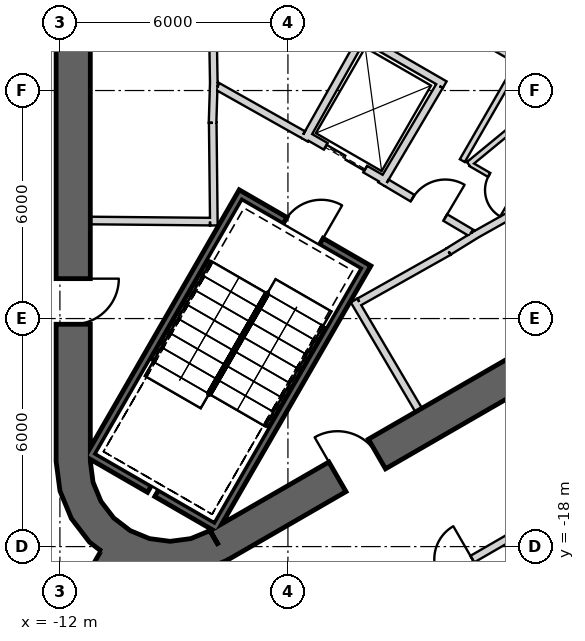
"""IFC4 building model, lengths in metres.
Left out: names, types, materials, properties, quantities, classifications, styles, units other than length and angle.
Written with IfcOpenShell. Run it as: python <this file> out.ifc"""

import sys

from ifc_helpers import new_model, si_unit, direction, frame, frame_2d, origin, place, context, subcontext, project, spatial, polyline, rectangle, outline, extrude, element, fill, save


model = new_model("IFC4")
c1 = context("Model", 3, precision=1e-05, world=origin(), true_north=direction((0.0, 1.0)))
c2 = subcontext(c1, "Body", "Model", "MODEL_VIEW")
j1 = project(units=[si_unit("LENGTHUNIT", "METRE"), si_unit("PLANEANGLEUNIT", "RADIAN")], contexts=[c1])
p1 = place(None, origin())
s1 = spatial("IfcSite", under=j1, at=p1, CompositionType="ELEMENT")
p2 = place(p1, origin())
s2 = spatial("IfcBuilding", under=s1, at=p2, CompositionType="ELEMENT")
p3 = place(p2, frame((0.0, 0.0, 163.2)))
s3 = spatial("IfcBuildingStorey", under=s2, at=p3, CompositionType="ELEMENT", Elevation=163.2)
p4 = place(p3, frame((-11.65, 15.762, 0.0), z_axis=(0.0, 0.0, 1.0), x_axis=(0.0, -1.0, 0.0)))
e1 = element("IfcWall", 1, at=p4, inside=s3, PredefinedType="SHEAR", context=c2, shape_type="SweptSolid", body=[
    extrude(rectangle(XDim=31.523, YDim=0.9, at=frame_2d((15.762, 0.0))), origin(), (0.0, 0.0, 1.0), 6.0),
])
p5 = place(p4, frame((3.612, 0.0, 0.0)))
e2 = element("IfcOpeningElement", 2, at=p5, cuts=e1, PredefinedType="OPENING", context=c2, shape_type="SweptSolid", body=[
    extrude(rectangle(XDim=1.2, YDim=2.4, at=frame_2d((0.6, 1.2))), frame((0.0, 0.46, 0.0), z_axis=(0.0, -1.0, 0.0), x_axis=(1.0, 0.0, 0.0)), (0.0, 0.0, 1.0), 0.92),
])
p6 = place(p4, frame((26.712, 0.0, 0.0)))
e3 = element("IfcOpeningElement", 3, at=p6, cuts=e1, PredefinedType="OPENING", context=c2, shape_type="SweptSolid", body=[
    extrude(rectangle(XDim=1.2, YDim=2.4, at=frame_2d((0.6, 1.2))), frame((0.0, 0.46, 0.0), z_axis=(0.0, -1.0, 0.0), x_axis=(1.0, 0.0, 0.0)), (0.0, 0.0, 1.0), 0.92),
])
p7 = place(p3, frame((-7.825, -17.97, 0.0), z_axis=(0.0, 0.0, 1.0), x_axis=(0.866028369851, 0.499994862586, 0.0)))
e4 = element("IfcWall", 4, at=p7, inside=s3, PredefinedType="SHEAR", context=c2, shape_type="SweptSolid", body=[
    extrude(rectangle(XDim=31.523, YDim=0.9, at=frame_2d((15.762, 0.0))), origin(), (0.0, 0.0, 1.0), 6.0),
])
p8 = place(p7, frame((26.712, 0.0, 0.0)))
e5 = element("IfcOpeningElement", 5, at=p8, cuts=e4, PredefinedType="OPENING", context=c2, shape_type="SweptSolid", body=[
    extrude(rectangle(XDim=1.2, YDim=2.4, at=frame_2d((0.6, 1.2))), frame((0.0, 0.46, 0.0), z_axis=(0.0, -1.0, 0.0), x_axis=(1.0, 0.0, 0.0)), (0.0, 0.0, 1.0), 0.92),
])
p9 = place(p7, frame((3.612, 0.0, 0.0)))
e6 = element("IfcOpeningElement", 6, at=p9, cuts=e4, PredefinedType="OPENING", context=c2, shape_type="SweptSolid", body=[
    extrude(rectangle(XDim=1.2, YDim=2.4, at=frame_2d((0.6, 1.2))), frame((0.0, 0.46, 0.0), z_axis=(0.0, -1.0, 0.0), x_axis=(1.0, 0.0, 0.0)), (0.0, 0.0, 1.0), 0.92),
])
p10 = place(p3, origin())
e7 = element("IfcWall", 7, at=p10, inside=s3, PredefinedType="SHEAR", context=c2, shape_type="SweptSolid", body=[
    extrude(outline(polyline([(-12.1, -15.762), (-11.998, -16.538), (-11.698, -17.262), (-11.221, -17.883), (-10.6, -18.36), (-9.876, -18.659), (-9.1, -18.762), (-8.323, -18.659), (-7.6, -18.36), (-8.05, -17.58), (-8.556, -17.79), (-9.1, -17.862), (-9.644, -17.79), (-10.15, -17.58), (-10.585, -17.247), (-10.919, -16.812), (-11.128, -16.305), (-11.2, -15.762), (-12.1, -15.762)])), origin(), (0.0, 0.0, 1.0), 6.0),
])
p11 = place(p3, frame((-10.575, -18.316, 0.0), z_axis=(0.0, 0.0, 1.0), x_axis=(-0.500002326941, -0.86602406032, 0.0)))
e8 = element("IfcWall", 8, at=p11, inside=s3, PredefinedType="SHEAR", context=c2, shape_type="SweptSolid", body=[
    extrude(rectangle(XDim=12.384, YDim=0.8, at=frame_2d((6.192, 0.0))), origin(), (0.0, 0.0, 1.0), 6.0),
])
p12 = place(p11, frame((1.2, 0.0, 0.0)))
e9 = element("IfcOpeningElement", 9, at=p12, cuts=e8, PredefinedType="OPENING", context=c2, shape_type="SweptSolid", body=[
    extrude(rectangle(XDim=1.4, YDim=2.4, at=frame_2d((0.7, 1.2))), frame((0.0, 0.41, 0.0), z_axis=(0.0, -1.0, 0.0), x_axis=(1.0, 0.0, 0.0)), (0.0, 0.0, 1.0), 0.82),
])
p13 = place(p3, frame((-3.41, -32.318, 0.0), z_axis=(0.0, 0.0, 1.0), x_axis=(0.852773716093, 0.52228056554, 0.0)))
e10 = element("IfcWall", 10, at=p13, inside=s3, PredefinedType="SOLIDWALL", context=c2, shape_type="SweptSolid", body=[
    extrude(rectangle(XDim=38.239, YDim=0.24, at=frame_2d((19.12, 0.0))), origin(), (0.0, 0.0, 1.0), 5.7),
])
p14 = place(p3, frame((-7.95, -5.772, 0.0), z_axis=(0.0, 0.0, 1.0), x_axis=(-0.030803413295, -0.999525462272, 0.0)))
e11 = element("IfcWall", 11, at=p14, inside=s3, PredefinedType="PLUMBINGWALL", context=c2, shape_type="SweptSolid", body=[
    extrude(rectangle(XDim=1.078, YDim=0.2, at=frame_2d((0.539, 0.0))), origin(), (0.0, 0.0, 1.0), 5.7),
])
p15 = place(p3, frame((-7.98, -4.05, 0.0), z_axis=(0.0, 0.0, 1.0), x_axis=(0.016809909365, -0.999858703491, 0.0)))
e12 = element("IfcWall", 12, at=p15, inside=s3, PredefinedType="PLUMBINGWALL", context=c2, shape_type="SweptSolid", body=[
    extrude(rectangle(XDim=1.844, YDim=0.2, at=frame_2d((0.922, 0.0))), origin(), (0.0, 0.0, 1.0), 5.7),
])
p16 = place(p3, frame((-7.979, -6.85, 0.0), z_axis=(0.0, 0.0, 1.0), x_axis=(0.011121475088, -0.999938154483, 0.0)))
e13 = element("IfcWall", 13, at=p16, inside=s3, PredefinedType="PLUMBINGWALL", context=c2, shape_type="SweptSolid", body=[
    extrude(rectangle(XDim=2.7, YDim=0.2, at=frame_2d((1.35, 0.0))), origin(), (0.0, 0.0, 1.0), 5.7),
])
p17 = place(p3, frame((-8.05, -9.449, 0.0), z_axis=(0.0, 0.0, 1.0), x_axis=(-0.999957467379, 0.009222983926, 0.0)))
e14 = element("IfcWall", 14, at=p17, inside=s3, PredefinedType="PLUMBINGWALL", context=c2, shape_type="SweptSolid", body=[
    extrude(rectangle(XDim=3.15, YDim=0.2, at=frame_2d((1.575, 0.0))), origin(), (0.0, 0.0, 1.0), 5.7),
])
p18 = place(p3, frame((-2.558, -14.409, 0.0), z_axis=(0.0, 0.0, 1.0), x_axis=(-0.507997497166, 0.861358544901, 0.0)))
e15 = element("IfcWall", 15, at=p18, inside=s3, PredefinedType="PLUMBINGWALL", context=c2, shape_type="SweptSolid", body=[
    extrude(rectangle(XDim=3.35, YDim=0.2, at=frame_2d((1.675, 0.0))), origin(), (0.0, 0.0, 1.0), 5.7),
])
p19 = place(p3, frame((-1.769, -10.237, 0.0), z_axis=(0.0, 0.0, 1.0), x_axis=(-0.871534483978, -0.490334215854, 0.0)))
e16 = element("IfcWall", 16, at=p19, inside=s3, PredefinedType="PLUMBINGWALL", context=c2, shape_type="SweptSolid", body=[
    extrude(rectangle(XDim=2.7, YDim=0.2, at=frame_2d((1.35, 0.0))), origin(), (0.0, 0.0, 1.0), 5.7),
])
p20 = place(p3, frame((-1.024, -9.771, 0.0), z_axis=(0.0, 0.0, 1.0), x_axis=(-0.850348075135, -0.526220629693, 0.0)))
e17 = element("IfcWall", 17, at=p20, inside=s3, PredefinedType="PLUMBINGWALL", context=c2, shape_type="SweptSolid", body=[
    extrude(rectangle(XDim=0.878, YDim=0.2, at=frame_2d((0.439, 0.0))), origin(), (0.0, 0.0, 1.0), 5.7),
])
p21 = place(p3, frame((-1.13, -9.832, 0.0), z_axis=(0.0, 0.0, 1.0), x_axis=(0.871988740738, 0.489525929882, 0.0)))
e18 = element("IfcWall", 18, at=p21, inside=s3, PredefinedType="PLUMBINGWALL", context=c2, shape_type="SweptSolid", body=[
    extrude(rectangle(XDim=1.845, YDim=0.2, at=frame_2d((0.922, 0.0))), origin(), (0.0, 0.0, 1.0), 5.7),
])
p22 = place(p3, frame((-3.905, -10.563, -0.35), z_axis=(0.0, 0.0, 1.0), x_axis=(-0.500012932018, -0.866017937352, 0.0)))
e19 = element("IfcWall", 19, at=p22, inside=s3, PredefinedType="SHEAR", context=c2, shape_type="SweptSolid", body=[
    extrude(rectangle(XDim=8.1, YDim=0.2, at=frame_2d((4.05, 0.0))), origin(), (0.0, 0.0, 1.0), 6.05),
])
p23 = place(p3, frame((-11.282, -15.541, -0.35), z_axis=(0.0, 0.0, 1.0), x_axis=(0.866000578957, -0.500042995397, 0.0)))
e20 = element("IfcWall", 20, at=p23, inside=s3, PredefinedType="SHEAR", context=c2, shape_type="SweptSolid", body=[
    extrude(rectangle(XDim=1.89, YDim=0.2, at=frame_2d((0.945, 0.0))), origin(), (0.0, 0.0, 1.0), 6.05),
])
p24 = place(p3, frame((-9.455, -16.596, -0.35), z_axis=(0.0, 0.0, 1.0), x_axis=(0.866038843867, -0.499976720371, 0.0)))
e21 = element("IfcWall", 21, at=p24, inside=s3, PredefinedType="SHEAR", context=c2, shape_type="SweptSolid", body=[
    extrude(rectangle(XDim=1.69, YDim=0.2, at=frame_2d((0.845, 0.0))), origin(), (0.0, 0.0, 1.0), 6.05),
])
p25 = place(p3, frame((-7.196, -8.663, -0.35), z_axis=(0.0, 0.0, 1.0), x_axis=(-0.499997992926, -0.866026562566, 0.0)))
e22 = element("IfcWall", 22, at=p25, inside=s3, PredefinedType="SHEAR", context=c2, shape_type="SweptSolid", body=[
    extrude(rectangle(XDim=7.9, YDim=0.2, at=frame_2d((3.95, 0.0))), origin(), (0.0, 0.0, 1.0), 6.05),
])
p26 = place(p3, frame((-4.041, -10.599, -0.35), z_axis=(0.0, 0.0, 1.0), x_axis=(-0.866047807691, 0.499961193289, 0.0)))
e23 = element("IfcWall", 23, at=p26, inside=s3, PredefinedType="SHEAR", context=c2, shape_type="SweptSolid", body=[
    extrude(rectangle(XDim=3.6, YDim=0.2, at=frame_2d((1.8, 0.0))), origin(), (0.0, 0.0, 1.0), 6.05),
])
p27 = place(p26, frame((1.25, 0.0, 0.35)))
e24 = element("IfcOpeningElement", 24, at=p27, cuts=e23, PredefinedType="OPENING", context=c2, shape_type="SweptSolid", body=[
    extrude(rectangle(XDim=1.1, YDim=2.1, at=frame_2d((0.55, 1.05))), frame((0.0, 0.11, 0.0), z_axis=(0.0, -1.0, 0.0), x_axis=(1.0, 0.0, 0.0)), (0.0, 0.0, 1.0), 0.22),
])
p28 = place(p3, frame((-3.446, -8.368, 0.0), z_axis=(0.0, 0.0, 1.0), x_axis=(-0.866024647952, 0.500001309137, 0.0)))
e25 = element("IfcWall", 25, at=p28, inside=s3, PredefinedType="PLUMBINGWALL", context=c2, shape_type="SweptSolid", body=[
    extrude(rectangle(XDim=2.4, YDim=0.2, at=frame_2d((1.2, 0.0))), origin(), (0.0, 0.0, 1.0), 5.7),
])
p29 = place(p28, frame((0.6, 0.0, 0.0)))
e26 = element("IfcOpeningElement", 26, at=p29, cuts=e25, PredefinedType="OPENING", context=c2, shape_type="SweptSolid", body=[
    extrude(rectangle(XDim=1.2, YDim=2.4, at=frame_2d((0.6, 1.2))), frame((0.0, 0.11, 0.0), z_axis=(0.0, -1.0, 0.0), x_axis=(1.0, 0.0, 0.0)), (0.0, 0.0, 1.0), 0.22),
])
p30 = place(p3, frame((-5.562, -7.296, 0.0), z_axis=(0.0, 0.0, 1.0), x_axis=(0.491322718731, 0.870977603649, 0.0)))
e27 = element("IfcWall", 27, at=p30, inside=s3, PredefinedType="PLUMBINGWALL", context=c2, shape_type="SweptSolid", body=[
    extrude(rectangle(XDim=3.1, YDim=0.2, at=frame_2d((1.55, 0.0))), origin(), (0.0, 0.0, 1.0), 5.7),
])
p31 = place(p3, frame((-3.814, -4.726, 0.0), z_axis=(0.0, 0.0, 1.0), x_axis=(0.866000409959, -0.500043288077, 0.0)))
e28 = element("IfcWall", 28, at=p31, inside=s3, PredefinedType="PLUMBINGWALL", context=c2, shape_type="SweptSolid", body=[
    extrude(rectangle(XDim=2.24, YDim=0.2, at=frame_2d((1.12, 0.0))), origin(), (0.0, 0.0, 1.0), 5.7),
])
p32 = place(p3, frame((-2.012, -5.882, 0.0), z_axis=(0.0, 0.0, 1.0), x_axis=(-0.508619639323, -0.860991325447, 0.0)))
e29 = element("IfcWall", 29, at=p32, inside=s3, PredefinedType="PLUMBINGWALL", context=c2, shape_type="SweptSolid", body=[
    extrude(rectangle(XDim=3.0, YDim=0.2, at=frame_2d((1.5, 0.0))), origin(), (0.0, 0.0, 1.0), 5.7),
])
p33 = place(p3, frame((-7.849, -5.894, 0.0), z_axis=(0.0, 0.0, 1.0), x_axis=(0.871340486379, -0.490678873396, 0.0)))
e30 = element("IfcWall", 30, at=p33, inside=s3, PredefinedType="PARTITIONING", context=c2, shape_type="SweptSolid", body=[
    extrude(rectangle(XDim=2.581, YDim=0.2, at=frame_2d((1.291, 0.0))), origin(), (0.0, 0.0, 1.0), 5.7),
])
p34 = place(p3, frame((-3.401, -8.43, 0.0), z_axis=(0.0, 0.0, 1.0), x_axis=(0.860598681535, -0.509283721849, 0.0)))
e31 = element("IfcWall", 31, at=p34, inside=s3, PredefinedType="PARTITIONING", context=c2, shape_type="SweptSolid", body=[
    extrude(rectangle(XDim=2.581, YDim=0.2, at=frame_2d((1.291, 0.0))), origin(), (0.0, 0.0, 1.0), 5.7),
])
p35 = place(p34, frame((0.791, 0.0, 0.0)))
e32 = element("IfcOpeningElement", 32, at=p35, cuts=e31, PredefinedType="OPENING", context=c2, shape_type="SweptSolid", body=[
    extrude(rectangle(XDim=1.0, YDim=2.1, at=frame_2d((0.5, 1.05))), frame((0.0, 0.11, 0.0), z_axis=(0.0, -1.0, 0.0), x_axis=(1.0, 0.0, 0.0)), (0.0, 0.0, 1.0), 0.22),
])
p36 = place(p3, frame((6.834, -1.302, 0.0), z_axis=(0.0, 0.0, 1.0), x_axis=(-0.772564687607, -0.634936062499, 0.0)))
e33 = element("IfcWall", 33, at=p36, inside=s3, PredefinedType="PLUMBINGWALL", context=c2, shape_type="SweptSolid", body=[
    extrude(rectangle(XDim=10.457, YDim=0.15, at=frame_2d((5.229, 0.0))), origin(), (0.0, 0.0, 1.0), 5.7),
])
p37 = place(p3, frame((0.126, -5.182, 0.0), z_axis=(0.0, 0.0, 1.0), x_axis=(-0.499956128963, -0.866050731258, 0.0)))
e34 = element("IfcWall", 34, at=p37, inside=s3, PredefinedType="PLUMBINGWALL", context=c2, shape_type="SweptSolid", body=[
    extrude(rectangle(XDim=3.075, YDim=0.15, at=frame_2d((1.538, 0.0))), origin(), (0.0, 0.0, 1.0), 5.7),
])
p38 = place(p3, frame((-1.579, -4.285, 0.0), z_axis=(0.0, 0.0, 1.0), x_axis=(0.866033964044, -0.499985172903, 0.0)))
e35 = element("IfcWall", 35, at=p38, inside=s3, PredefinedType="PLUMBINGWALL", context=c2, shape_type="SweptSolid", body=[
    extrude(rectangle(XDim=1.85, YDim=0.15, at=frame_2d((0.925, 0.0))), origin(), (0.0, 0.0, 1.0), 5.7),
])
p39 = place(p3, frame((-1.195, -7.936, 0.0), z_axis=(0.0, 0.0, 1.0), x_axis=(0.864964234746, -0.501833510848, 0.0)))
e36 = element("IfcWall", 36, at=p39, inside=s3, PredefinedType="PARTITIONING", context=c2, shape_type="SweptSolid", body=[
    extrude(rectangle(XDim=1.931, YDim=0.12, at=frame_2d((0.965, 0.0))), origin(), (0.0, 0.0, 1.0), 5.7),
])
p40 = place(p39, frame((0.565, 0.0, 0.0)))
e37 = element("IfcOpeningElement", 37, at=p40, cuts=e36, PredefinedType="OPENING", context=c2, shape_type="SweptSolid", body=[
    extrude(rectangle(XDim=0.8, YDim=2.1, at=frame_2d((0.4, 1.05))), frame((0.0, 0.07, 0.0), z_axis=(0.0, -1.0, 0.0), x_axis=(1.0, 0.0, 0.0)), (0.0, 0.0, 1.0), 0.14),
])
p41 = place(p3, frame((-6.644, -21.503, 0.0), z_axis=(0.0, 0.0, 1.0), x_axis=(0.866024386084, 0.500001762705, 0.0)))
e38 = element("IfcWall", 38, at=p41, inside=s3, PredefinedType="PARTITIONING", context=c2, shape_type="SweptSolid", body=[
    extrude(rectangle(XDim=7.919, YDim=0.2, at=frame_2d((3.96, 0.0))), origin(), (0.0, 0.0, 1.0), 4.88),
])
p42 = place(p41, frame((1.5, 0.0, 0.0)))
e39 = element("IfcOpeningElement", 39, at=p42, cuts=e38, PredefinedType="OPENING", context=c2, shape_type="SweptSolid", body=[
    extrude(rectangle(XDim=1.0, YDim=2.1, at=frame_2d((0.5, 1.05))), frame((0.0, 0.11, 0.0), z_axis=(0.0, -1.0, 0.0), x_axis=(1.0, 0.0, 0.0)), (0.0, 0.0, 1.0), 0.22),
])
p43 = place(p41, frame((5.346, 0.0, 0.0)))
e40 = element("IfcOpeningElement", 40, at=p43, cuts=e38, PredefinedType="OPENING", context=c2, shape_type="SweptSolid", body=[
    extrude(rectangle(XDim=1.0, YDim=2.1, at=frame_2d((0.5, 1.05))), frame((0.0, 0.11, 0.0), z_axis=(0.0, -1.0, 0.0), x_axis=(1.0, 0.0, 0.0)), (0.0, 0.0, 1.0), 0.22),
])
p44 = place(p27, origin())
e41 = element("IfcDoor", 41, at=p44, inside=s3, OperationType="SINGLE_SWING_LEFT", PredefinedType="USERDEFINED", context=c2, shape_type="SweptSolid", body=[
    extrude(rectangle(XDim=1.1, YDim=2.1, at=frame_2d((0.55, 1.05))), frame((0.0, 0.025, 0.0), z_axis=(0.0, -1.0, 0.0), x_axis=(1.0, 0.0, 0.0)), (0.0, 0.0, 1.0), 0.05),
])
fill(e24, e41)
p45 = place(p35, origin())
e42 = element("IfcDoor", 42, at=p45, inside=s3, OperationType="SINGLE_SWING_RIGHT", PredefinedType="USERDEFINED", context=c2, shape_type="SweptSolid", body=[
    extrude(rectangle(XDim=1.0, YDim=2.1, at=frame_2d((0.5, 1.05))), frame((0.0, 0.025, 0.0), z_axis=(0.0, -1.0, 0.0), x_axis=(1.0, 0.0, 0.0)), (0.0, 0.0, 1.0), 0.05),
])
fill(e32, e42)
p46 = place(p29, origin())
e43 = element("IfcDoor", 43, at=p46, inside=s3, OperationType="SLIDING_TO_LEFT", PredefinedType="USERDEFINED", context=c2, shape_type="SweptSolid", body=[
    extrude(rectangle(XDim=1.2, YDim=2.4, at=frame_2d((0.6, 1.2))), frame((0.0, 0.025, 0.0), z_axis=(0.0, -1.0, 0.0), x_axis=(1.0, 0.0, 0.0)), (0.0, 0.0, 1.0), 0.05),
])
fill(e26, e43)
p47 = place(p40, origin())
e44 = element("IfcDoor", 44, at=p47, inside=s3, OperationType="SINGLE_SWING_RIGHT", PredefinedType="USERDEFINED", context=c2, shape_type="SweptSolid", body=[
    extrude(rectangle(XDim=0.8, YDim=2.1, at=frame_2d((0.4, 1.05))), frame((0.0, 0.025, 0.0), z_axis=(0.0, -1.0, 0.0), x_axis=(1.0, 0.0, 0.0)), (0.0, 0.0, 1.0), 0.05),
])
fill(e37, e44)
p48 = place(p43, origin())
e45 = element("IfcDoor", 45, at=p48, inside=s3, OperationType="SINGLE_SWING_RIGHT", PredefinedType="USERDEFINED", context=c2, shape_type="SweptSolid", body=[
    extrude(rectangle(XDim=1.0, YDim=2.1, at=frame_2d((0.5, 1.05))), frame((0.0, 0.025, 0.0), z_axis=(0.0, -1.0, 0.0), x_axis=(1.0, 0.0, 0.0)), (0.0, 0.0, 1.0), 0.05),
])
fill(e40, e45)
p49 = place(p6, origin())
e46 = element("IfcDoor", 46, at=p49, inside=s3, OperationType="SINGLE_SWING_LEFT", PredefinedType="USERDEFINED", context=c2, shape_type="SweptSolid", body=[
    extrude(rectangle(XDim=1.2, YDim=2.4, at=frame_2d((0.6, 1.2))), frame((0.0, 0.025, 0.0), z_axis=(0.0, -1.0, 0.0), x_axis=(1.0, 0.0, 0.0)), (0.0, 0.0, 1.0), 0.05),
])
fill(e3, e46)
p50 = place(p9, origin())
e47 = element("IfcDoor", 47, at=p50, inside=s3, OperationType="SINGLE_SWING_LEFT", PredefinedType="USERDEFINED", context=c2, shape_type="SweptSolid", body=[
    extrude(rectangle(XDim=1.2, YDim=2.4, at=frame_2d((0.6, 1.2))), frame((0.0, 0.025, 0.0), z_axis=(0.0, -1.0, 0.0), x_axis=(1.0, 0.0, 0.0)), (0.0, 0.0, 1.0), 0.05),
])
fill(e6, e47)
save(model, sys.argv[1])
